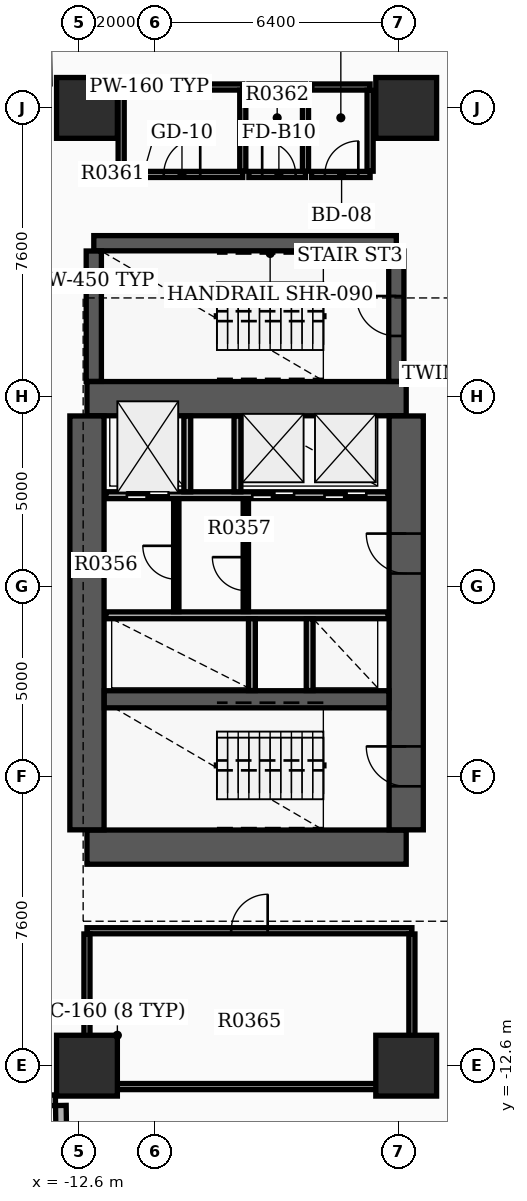
"""IFC4 building model, lengths in metres.
Left out: names, types, materials, properties, quantities, classifications, styles, units other than length and angle.
Written with IfcOpenShell. Run it as: python <this file> out.ifc"""

import sys

from ifc_helpers import new_model, si_unit, direction, frame, frame_2d, origin, origin_2d, place, context, subcontext, project, spatial, rectangle, extrude, element, fill, save


model = new_model("IFC4")
c1 = context("Model", 3, precision=1e-05, world=origin(), true_north=direction((0.0, 1.0)))
c2 = subcontext(c1, "Body", "Model", "MODEL_VIEW")
j1 = project(units=[si_unit("LENGTHUNIT", "METRE"), si_unit("PLANEANGLEUNIT", "RADIAN")], contexts=[c1])
p1 = place(None, origin())
s1 = spatial("IfcSite", under=j1, at=p1, CompositionType="ELEMENT")
p2 = place(p1, origin())
s2 = spatial("IfcBuilding", under=s1, at=p2, CompositionType="ELEMENT")
p3 = place(p2, frame((0.0, 0.0, 27.6)))
s3 = spatial("IfcBuildingStorey", under=s2, at=p3, CompositionType="ELEMENT", Elevation=27.6)
for number, where, z_axis, x_axis in (
    (1, (-12.4, -6.85, 0.0), (0.0, 0.0, 1.0), (1.0, 0.0, 0.0)),
    (2, (-12.4, 4.95, 0.0), (0.0, 0.0, 1.0), (1.0, 0.0, 0.0)),
):
    element("IfcWall", number, at=place(p3, frame(where, z_axis=z_axis, x_axis=x_axis)), inside=s3, PredefinedType="SHEAR", context=c2, shape_type="SweptSolid", body=[
        extrude(rectangle(XDim=8.4, YDim=0.9, at=frame_2d((4.2, 0.0))), origin(), (0.0, 0.0, 1.0), 3.7),
    ])
p4 = place(p3, frame((-12.4, -6.395, 0.0), z_axis=(0.0, 0.0, 1.0), x_axis=(0.0, 1.0, 0.0)))
e3 = element("IfcWall", 3, at=p4, inside=s3, PredefinedType="SHEAR", context=c2, shape_type="SweptSolid", body=[
    extrude(rectangle(XDim=10.89, YDim=0.9, at=frame_2d((5.445, 0.0))), origin(), (0.0, 0.0, 1.0), 3.7),
])
p5 = place(p3, frame((-4.0, -6.395, 0.0), z_axis=(0.0, 0.0, 1.0), x_axis=(0.0, 1.0, 0.0)))
e4 = element("IfcWall", 4, at=p5, inside=s3, PredefinedType="SHEAR", context=c2, shape_type="SweptSolid", body=[
    extrude(rectangle(XDim=10.89, YDim=0.9, at=frame_2d((5.445, 0.0))), origin(), (0.0, 0.0, 1.0), 3.7),
])
p6 = place(p5, frame((1.145, 0.0, 0.0)))
e5 = element("IfcOpeningElement", 5, at=p6, cuts=e4, PredefinedType="OPENING", context=c2, shape_type="SweptSolid", body=[
    extrude(rectangle(XDim=1.05, YDim=2.15, at=frame_2d((0.525, 1.075))), frame((0.0, 0.46, 0.0), z_axis=(0.0, -1.0, 0.0), x_axis=(1.0, 0.0, 0.0)), (0.0, 0.0, 1.0), 0.92),
])
p7 = place(p5, frame((6.745, 0.0, 0.0)))
e6 = element("IfcOpeningElement", 6, at=p7, cuts=e4, PredefinedType="OPENING", context=c2, shape_type="SweptSolid", body=[
    extrude(rectangle(XDim=1.05, YDim=2.15, at=frame_2d((0.525, 1.075))), frame((0.0, 0.46, 0.0), z_axis=(0.0, -1.0, 0.0), x_axis=(1.0, 0.0, 0.0)), (0.0, 0.0, 1.0), 0.92),
])
p8 = place(p3, frame((-11.945, -2.96, 0.0), z_axis=(0.0, 0.0, 1.0), x_axis=(1.0, 0.0, 0.0)))
e7 = element("IfcWall", 7, at=p8, inside=s3, PredefinedType="SHEAR", context=c2, shape_type="SweptSolid", body=[
    extrude(rectangle(XDim=7.49, YDim=0.45, at=frame_2d((3.745, 0.0))), origin(), (0.0, 0.0, 1.0), 3.7),
])
p9 = place(p3, frame((-12.22, 9.04, 0.0), z_axis=(0.0, 0.0, 1.0), x_axis=(1.0, 0.0, 0.0)))
e8 = element("IfcWall", 8, at=p9, inside=s3, PredefinedType="SHEAR", context=c2, shape_type="SweptSolid", body=[
    extrude(rectangle(XDim=7.96, YDim=0.4, at=frame_2d((3.98, 0.0))), origin(), (0.0, 0.0, 1.0), 3.7),
])
p10 = place(p3, frame((-12.22, 5.405, 0.0), z_axis=(0.0, 0.0, 1.0), x_axis=(0.0, 1.0, 0.0)))
e9 = element("IfcWall", 9, at=p10, inside=s3, PredefinedType="SHEAR", context=c2, shape_type="SweptSolid", body=[
    extrude(rectangle(XDim=3.43, YDim=0.4, at=frame_2d((1.715, 0.0))), origin(), (0.0, 0.0, 1.0), 3.7),
])
p11 = place(p3, frame((-4.26, 5.405, 0.0), z_axis=(0.0, 0.0, 1.0), x_axis=(0.0, 1.0, 0.0)))
e10 = element("IfcWall", 10, at=p11, inside=s3, PredefinedType="SHEAR", context=c2, shape_type="SweptSolid", body=[
    extrude(rectangle(XDim=3.43, YDim=0.4, at=frame_2d((1.715, 0.0))), origin(), (0.0, 0.0, 1.0), 3.7),
])
p12 = place(p11, frame((1.195, 0.0, 0.0)))
e11 = element("IfcOpeningElement", 11, at=p12, cuts=e10, PredefinedType="OPENING", context=c2, shape_type="SweptSolid", body=[
    extrude(rectangle(XDim=1.05, YDim=2.15, at=frame_2d((0.525, 1.075))), frame((0.0, 0.21, 0.0), z_axis=(0.0, -1.0, 0.0), x_axis=(1.0, 0.0, 0.0)), (0.0, 0.0, 1.0), 0.42),
])
for number, where, z_axis, x_axis in (
    (12, (-12.4, -12.6, 0.0), (0.0, 0.0, 1.0), (1.0, 0.0, 0.0)),
    (13, (-12.4, 12.6, 0.0), (0.0, 0.0, 1.0), (1.0, 0.0, 0.0)),
    (14, (-4.0, -12.6, 0.0), (0.0, 0.0, 1.0), (1.0, 0.0, 0.0)),
    (15, (-4.0, 12.6, 0.0), (0.0, 0.0, 1.0), (1.0, 0.0, 0.0)),
):
    element("IfcColumn", number, at=place(p3, frame(where, z_axis=z_axis, x_axis=x_axis)), inside=s3, PredefinedType="COLUMN", context=c2, shape_type="SweptSolid", body=[
        extrude(rectangle(XDim=1.6, YDim=1.6, at=origin_2d()), origin(), (0.0, 0.0, 1.0), 3.9),
    ])
p13 = place(p3, frame((-14.449, -13.529, 0.0), z_axis=(0.0, 0.0, 1.0), x_axis=(0.999878147354, 0.015610587569, 0.0)))
e16 = element("IfcWall", 16, at=p13, inside=s3, PredefinedType="STANDARD", context=c2, shape_type="SweptSolid", body=[
    extrude(rectangle(XDim=1.22, YDim=0.28, at=frame_2d((0.61, 0.0))), origin(), (0.0, 0.0, 1.0), 2.91),
])
p14 = place(p3, frame((-13.087, -13.647, 0.0), z_axis=(0.0, 0.0, 1.0), x_axis=(0.015785793208, -0.999875396603, 0.0)))
e17 = element("IfcWall", 17, at=p14, inside=s3, PredefinedType="STANDARD", context=c2, shape_type="SweptSolid", body=[
    extrude(rectangle(XDim=1.5, YDim=0.28, at=frame_2d((0.75, 0.0))), origin(), (0.0, 0.0, 1.0), 2.91),
])
p15 = place(p3, frame((-11.9, 2.41, 0.0), z_axis=(0.0, 0.0, 1.0), x_axis=(1.0, 0.0, 0.0)))
e18 = element("IfcWall", 18, at=p15, inside=s3, PredefinedType="SOLIDWALL", context=c2, shape_type="SweptSolid", body=[
    extrude(rectangle(XDim=7.42, YDim=0.18, at=frame_2d((3.71, 0.0))), origin(), (0.0, 0.0, 1.0), 2.9),
])
p16 = place(p15, frame((0.55, 0.0, 0.0)))
e19 = element("IfcOpeningElement", 19, at=p16, cuts=e18, PredefinedType="OPENING", context=c2, shape_type="SweptSolid", body=[
    extrude(rectangle(XDim=1.1, YDim=2.15, at=frame_2d((0.55, 1.075))), frame((0.0, 0.1, 0.0), z_axis=(0.0, -1.0, 0.0), x_axis=(1.0, 0.0, 0.0)), (0.0, 0.0, 1.0), 0.2),
])
p17 = place(p15, frame((3.85, 0.0, 0.0)))
e20 = element("IfcOpeningElement", 20, at=p17, cuts=e18, PredefinedType="OPENING", context=c2, shape_type="SweptSolid", body=[
    extrude(rectangle(XDim=1.1, YDim=2.15, at=frame_2d((0.55, 1.075))), frame((0.0, 0.1, 0.0), z_axis=(0.0, -1.0, 0.0), x_axis=(1.0, 0.0, 0.0)), (0.0, 0.0, 1.0), 0.2),
])
p18 = place(p15, frame((5.75, 0.0, 0.0)))
e21 = element("IfcOpeningElement", 21, at=p18, cuts=e18, PredefinedType="OPENING", context=c2, shape_type="SweptSolid", body=[
    extrude(rectangle(XDim=1.1, YDim=2.15, at=frame_2d((0.55, 1.075))), frame((0.0, 0.1, 0.0), z_axis=(0.0, -1.0, 0.0), x_axis=(1.0, 0.0, 0.0)), (0.0, 0.0, 1.0), 0.2),
])
p19 = place(p3, frame((-11.9, -0.75, 0.0), z_axis=(0.0, 0.0, 1.0), x_axis=(1.0, 0.0, 0.0)))
e22 = element("IfcWall", 22, at=p19, inside=s3, PredefinedType="SOLIDWALL", context=c2, shape_type="SweptSolid", body=[
    extrude(rectangle(XDim=7.42, YDim=0.18, at=frame_2d((3.71, 0.0))), origin(), (0.0, 0.0, 1.0), 2.9),
])
for number, where, z_axis, x_axis in (
    (23, (-9.76, 2.5, 0.0), (0.0, 0.0, 1.0), (0.0, 1.0, 0.0)),
    (24, (-8.44, 2.5, 0.0), (0.0, 0.0, 1.0), (0.0, 1.0, 0.0)),
):
    element("IfcWall", number, at=place(p3, frame(where, z_axis=z_axis, x_axis=x_axis)), inside=s3, PredefinedType="SOLIDWALL", context=c2, shape_type="SweptSolid", body=[
        extrude(rectangle(XDim=1.99, YDim=0.18, at=frame_2d((0.995, 0.0))), origin(), (0.0, 0.0, 1.0), 2.9),
    ])
for number, where, z_axis, x_axis in (
    (25, (-8.06, -2.73, 0.0), (0.0, 0.0, 1.0), (0.0, 1.0, 0.0)),
    (26, (-6.54, -2.73, 0.0), (0.0, 0.0, 1.0), (0.0, 1.0, 0.0)),
):
    element("IfcWall", number, at=place(p3, frame(where, z_axis=z_axis, x_axis=x_axis)), inside=s3, PredefinedType="SOLIDWALL", context=c2, shape_type="SweptSolid", body=[
        extrude(rectangle(XDim=1.89, YDim=0.18, at=frame_2d((0.945, 0.0))), origin(), (0.0, 0.0, 1.0), 2.9),
    ])
p20 = place(p3, frame((-8.22, -0.65, 0.0), z_axis=(0.0, 0.0, 1.0), x_axis=(0.0, 1.0, 0.0)))
e27 = element("IfcWall", 27, at=p20, inside=s3, PredefinedType="SOLIDWALL", context=c2, shape_type="SweptSolid", body=[
    extrude(rectangle(XDim=2.96, YDim=0.14, at=frame_2d((1.48, 0.0))), origin(), (0.0, 0.0, 1.0), 2.9),
])
p21 = place(p20, frame((0.55, 0.0, 0.0)))
e28 = element("IfcOpeningElement", 28, at=p21, cuts=e27, PredefinedType="OPENING", context=c2, shape_type="SweptSolid", body=[
    extrude(rectangle(XDim=0.88, YDim=2.1, at=frame_2d((0.44, 1.05))), frame((0.0, 0.08, 0.0), z_axis=(0.0, -1.0, 0.0), x_axis=(1.0, 0.0, 0.0)), (0.0, 0.0, 1.0), 0.16),
])
p22 = place(p3, frame((-10.05, -0.652, 0.0), z_axis=(0.0, 0.0, 1.0), x_axis=(0.0, 1.0, 0.0)))
e29 = element("IfcWall", 29, at=p22, inside=s3, PredefinedType="PARTITIONING", context=c2, shape_type="SweptSolid", body=[
    extrude(rectangle(XDim=2.962, YDim=0.14, at=frame_2d((1.481, 0.0))), origin(), (0.0, 0.0, 1.0), 2.9),
])
p23 = place(p22, frame((0.85, 0.0, 0.0)))
e30 = element("IfcOpeningElement", 30, at=p23, cuts=e29, PredefinedType="OPENING", context=c2, shape_type="SweptSolid", body=[
    extrude(rectangle(XDim=0.88, YDim=2.1, at=frame_2d((0.44, 1.05))), frame((0.0, 0.08, 0.0), z_axis=(0.0, -1.0, 0.0), x_axis=(1.0, 0.0, 0.0)), (0.0, 0.0, 1.0), 0.16),
])
p24 = place(p3, frame((-11.5, 10.85, 0.0), z_axis=(0.0, 0.0, 1.0), x_axis=(1.0, 0.0, 0.0)))
e31 = element("IfcWall", 31, at=p24, inside=s3, PredefinedType="PARTITIONING", context=c2, shape_type="SweptSolid", body=[
    extrude(rectangle(XDim=3.2, YDim=0.16, at=frame_2d((1.6, 0.0))), origin(), (0.0, 0.0, 1.0), 2.9),
])
p25 = place(p24, frame((1.12, 0.0, 0.0)))
e32 = element("IfcOpeningElement", 32, at=p25, cuts=e31, PredefinedType="OPENING", context=c2, shape_type="SweptSolid", body=[
    extrude(rectangle(XDim=0.96, YDim=2.15, at=frame_2d((0.48, 1.075))), frame((0.0, 0.09, 0.0), z_axis=(0.0, -1.0, 0.0), x_axis=(1.0, 0.0, 0.0)), (0.0, 0.0, 1.0), 0.18),
])
p26 = place(p3, frame((-11.5, 13.15, 0.0), z_axis=(0.0, 0.0, 1.0), x_axis=(1.0, 0.0, 0.0)))
e33 = element("IfcWall", 33, at=p26, inside=s3, PredefinedType="PARTITIONING", context=c2, shape_type="SweptSolid", body=[
    extrude(rectangle(XDim=3.2, YDim=0.16, at=frame_2d((1.6, 0.0))), origin(), (0.0, 0.0, 1.0), 2.9),
])
for number, where, z_axis, x_axis in (
    (34, (-11.5, 10.935, 0.0), (0.0, 0.0, 1.0), (0.0, 1.0, 0.0)),
    (35, (-8.3, 10.935, 0.0), (0.0, 0.0, 1.0), (0.0, 1.0, 0.0)),
):
    element("IfcWall", number, at=place(p3, frame(where, z_axis=z_axis, x_axis=x_axis)), inside=s3, PredefinedType="PARTITIONING", context=c2, shape_type="SweptSolid", body=[
        extrude(rectangle(XDim=2.13, YDim=0.16, at=frame_2d((1.065, 0.0))), origin(), (0.0, 0.0, 1.0), 2.9),
    ])
p27 = place(p3, frame((-8.14, 10.85, 0.0), z_axis=(0.0, 0.0, 1.0), x_axis=(1.0, 0.0, 0.0)))
e36 = element("IfcWall", 36, at=p27, inside=s3, PredefinedType="PARTITIONING", context=c2, shape_type="SweptSolid", body=[
    extrude(rectangle(XDim=1.49, YDim=0.16, at=frame_2d((0.745, 0.0))), origin(), (0.0, 0.0, 1.0), 2.9),
])
p28 = place(p27, frame((0.35, 0.0, 0.0)))
e37 = element("IfcOpeningElement", 37, at=p28, cuts=e36, PredefinedType="OPENING", context=c2, shape_type="SweptSolid", body=[
    extrude(rectangle(XDim=0.88, YDim=2.1, at=frame_2d((0.44, 1.05))), frame((0.0, 0.09, 0.0), z_axis=(0.0, -1.0, 0.0), x_axis=(1.0, 0.0, 0.0)), (0.0, 0.0, 1.0), 0.18),
])
p29 = place(p3, frame((-8.14, 13.15, 0.0), z_axis=(0.0, 0.0, 1.0), x_axis=(1.0, 0.0, 0.0)))
e38 = element("IfcWall", 38, at=p29, inside=s3, PredefinedType="PARTITIONING", context=c2, shape_type="SweptSolid", body=[
    extrude(rectangle(XDim=1.49, YDim=0.16, at=frame_2d((0.745, 0.0))), origin(), (0.0, 0.0, 1.0), 2.9),
])
p30 = place(p3, frame((-6.65, 10.935, 0.0), z_axis=(0.0, 0.0, 1.0), x_axis=(0.0, 1.0, 0.0)))
e39 = element("IfcWall", 39, at=p30, inside=s3, PredefinedType="PARTITIONING", context=c2, shape_type="SweptSolid", body=[
    extrude(rectangle(XDim=2.13, YDim=0.16, at=frame_2d((1.065, 0.0))), origin(), (0.0, 0.0, 1.0), 2.9),
])
p31 = place(p3, frame((-6.49, 10.85, 0.0), z_axis=(0.0, 0.0, 1.0), x_axis=(1.0, 0.0, 0.0)))
e40 = element("IfcWall", 40, at=p31, inside=s3, PredefinedType="PARTITIONING", context=c2, shape_type="SweptSolid", body=[
    extrude(rectangle(XDim=1.54, YDim=0.16, at=frame_2d((0.77, 0.0))), origin(), (0.0, 0.0, 1.0), 2.9),
])
p32 = place(p31, frame((0.35, 0.0, 0.0)))
e41 = element("IfcOpeningElement", 41, at=p32, cuts=e40, PredefinedType="OPENING", context=c2, shape_type="SweptSolid", body=[
    extrude(rectangle(XDim=0.88, YDim=2.15, at=frame_2d((0.44, 1.075))), frame((0.0, 0.09, 0.0), z_axis=(0.0, -1.0, 0.0), x_axis=(1.0, 0.0, 0.0)), (0.0, 0.0, 1.0), 0.18),
])
p33 = place(p3, frame((-6.49, 13.15, 0.0), z_axis=(0.0, 0.0, 1.0), x_axis=(1.0, 0.0, 0.0)))
e42 = element("IfcWall", 42, at=p33, inside=s3, PredefinedType="PARTITIONING", context=c2, shape_type="SweptSolid", body=[
    extrude(rectangle(XDim=1.54, YDim=0.16, at=frame_2d((0.77, 0.0))), origin(), (0.0, 0.0, 1.0), 2.9),
])
p34 = place(p3, frame((-4.95, 10.935, 0.0), z_axis=(0.0, 0.0, 1.0), x_axis=(0.0, 1.0, 0.0)))
e43 = element("IfcWall", 43, at=p34, inside=s3, PredefinedType="PARTITIONING", context=c2, shape_type="SweptSolid", body=[
    extrude(rectangle(XDim=2.13, YDim=0.16, at=frame_2d((1.065, 0.0))), origin(), (0.0, 0.0, 1.0), 2.9),
])
p35 = place(p3, frame((-12.4, -13.15, 0.0), z_axis=(0.0, 0.0, 1.0), x_axis=(1.0, 0.0, 0.0)))
e44 = element("IfcWall", 44, at=p35, inside=s3, PredefinedType="PARTITIONING", context=c2, shape_type="SweptSolid", body=[
    extrude(rectangle(XDim=8.55, YDim=0.16, at=frame_2d((4.275, 0.0))), origin(), (0.0, 0.0, 1.0), 2.9),
])
p36 = place(p3, frame((-12.4, -9.05, 0.0), z_axis=(0.0, 0.0, 1.0), x_axis=(1.0, 0.0, 0.0)))
e45 = element("IfcWall", 45, at=p36, inside=s3, PredefinedType="PARTITIONING", context=c2, shape_type="SweptSolid", body=[
    extrude(rectangle(XDim=8.55, YDim=0.16, at=frame_2d((4.275, 0.0))), origin(), (0.0, 0.0, 1.0), 2.9),
])
p37 = place(p36, frame((3.795, 0.0, 0.0)))
e46 = element("IfcOpeningElement", 46, at=p37, cuts=e45, PredefinedType="OPENING", context=c2, shape_type="SweptSolid", body=[
    extrude(rectangle(XDim=0.96, YDim=2.15, at=frame_2d((0.48, 1.075))), frame((0.0, 0.09, 0.0), z_axis=(0.0, -1.0, 0.0), x_axis=(1.0, 0.0, 0.0)), (0.0, 0.0, 1.0), 0.18),
])
for number, where, z_axis, x_axis in (
    (47, (-12.4, -13.065, 0.0), (0.0, 0.0, 1.0), (0.0, 1.0, 0.0)),
    (48, (-3.85, -13.065, 0.0), (0.0, 0.0, 1.0), (0.0, 1.0, 0.0)),
):
    element("IfcWall", number, at=place(p3, frame(where, z_axis=z_axis, x_axis=x_axis)), inside=s3, PredefinedType="PARTITIONING", context=c2, shape_type="SweptSolid", body=[
        extrude(rectangle(XDim=3.93, YDim=0.16, at=frame_2d((1.965, 0.0))), origin(), (0.0, 0.0, 1.0), 2.9),
    ])
p38 = place(p6, origin())
e49 = element("IfcDoor", 49, at=p38, inside=s3, OperationType="SINGLE_SWING_RIGHT", PredefinedType="DOOR", context=c2, shape_type="SweptSolid", body=[
    extrude(rectangle(XDim=1.05, YDim=2.15, at=frame_2d((0.525, 1.075))), frame((0.0, 0.025, 0.0), z_axis=(0.0, -1.0, 0.0), x_axis=(1.0, 0.0, 0.0)), (0.0, 0.0, 1.0), 0.05),
])
fill(e5, e49)
p39 = place(p7, origin())
e50 = element("IfcDoor", 50, at=p39, inside=s3, OperationType="SINGLE_SWING_RIGHT", PredefinedType="DOOR", context=c2, shape_type="SweptSolid", body=[
    extrude(rectangle(XDim=1.05, YDim=2.15, at=frame_2d((0.525, 1.075))), frame((0.0, 0.025, 0.0), z_axis=(0.0, -1.0, 0.0), x_axis=(1.0, 0.0, 0.0)), (0.0, 0.0, 1.0), 0.05),
])
fill(e6, e50)
p40 = place(p12, origin())
e51 = element("IfcDoor", 51, at=p40, inside=s3, OperationType="SINGLE_SWING_RIGHT", PredefinedType="DOOR", context=c2, shape_type="SweptSolid", body=[
    extrude(rectangle(XDim=1.05, YDim=2.15, at=frame_2d((0.525, 1.075))), frame((0.0, 0.025, 0.0), z_axis=(0.0, -1.0, 0.0), x_axis=(1.0, 0.0, 0.0)), (0.0, 0.0, 1.0), 0.05),
])
fill(e11, e51)
p41 = place(p16, origin())
e52 = element("IfcDoor", 52, at=p41, inside=s3, OperationType="DOUBLE_DOOR_SLIDING", PredefinedType="DOOR", context=c2, shape_type="SweptSolid", body=[
    extrude(rectangle(XDim=1.1, YDim=2.15, at=frame_2d((0.55, 1.075))), frame((0.0, 0.025, 0.0), z_axis=(0.0, -1.0, 0.0), x_axis=(1.0, 0.0, 0.0)), (0.0, 0.0, 1.0), 0.05),
])
fill(e19, e52)
p42 = place(p17, origin())
e53 = element("IfcDoor", 53, at=p42, inside=s3, OperationType="DOUBLE_DOOR_SLIDING", PredefinedType="DOOR", context=c2, shape_type="SweptSolid", body=[
    extrude(rectangle(XDim=1.1, YDim=2.15, at=frame_2d((0.55, 1.075))), frame((0.0, 0.025, 0.0), z_axis=(0.0, -1.0, 0.0), x_axis=(1.0, 0.0, 0.0)), (0.0, 0.0, 1.0), 0.05),
])
fill(e20, e53)
p43 = place(p18, origin())
e54 = element("IfcDoor", 54, at=p43, inside=s3, OperationType="DOUBLE_DOOR_SLIDING", PredefinedType="DOOR", context=c2, shape_type="SweptSolid", body=[
    extrude(rectangle(XDim=1.1, YDim=2.15, at=frame_2d((0.55, 1.075))), frame((0.0, 0.025, 0.0), z_axis=(0.0, -1.0, 0.0), x_axis=(1.0, 0.0, 0.0)), (0.0, 0.0, 1.0), 0.05),
])
fill(e21, e54)
p44 = place(p21, origin())
e55 = element("IfcDoor", 55, at=p44, inside=s3, OperationType="SINGLE_SWING_RIGHT", PredefinedType="DOOR", context=c2, shape_type="SweptSolid", body=[
    extrude(rectangle(XDim=0.88, YDim=2.1, at=frame_2d((0.44, 1.05))), frame((0.0, 0.025, 0.0), z_axis=(0.0, -1.0, 0.0), x_axis=(1.0, 0.0, 0.0)), (0.0, 0.0, 1.0), 0.05),
])
fill(e28, e55)
p45 = place(p23, origin())
e56 = element("IfcDoor", 56, at=p45, inside=s3, OperationType="SINGLE_SWING_RIGHT", PredefinedType="DOOR", context=c2, shape_type="SweptSolid", body=[
    extrude(rectangle(XDim=0.88, YDim=2.1, at=frame_2d((0.44, 1.05))), frame((0.0, 0.025, 0.0), z_axis=(0.0, -1.0, 0.0), x_axis=(1.0, 0.0, 0.0)), (0.0, 0.0, 1.0), 0.05),
])
fill(e30, e56)
p46 = place(p25, origin())
e57 = element("IfcDoor", 57, at=p46, inside=s3, OperationType="SINGLE_SWING_RIGHT", PredefinedType="DOOR", context=c2, shape_type="SweptSolid", body=[
    extrude(rectangle(XDim=0.96, YDim=2.15, at=frame_2d((0.48, 1.075))), frame((0.0, 0.025, 0.0), z_axis=(0.0, -1.0, 0.0), x_axis=(1.0, 0.0, 0.0)), (0.0, 0.0, 1.0), 0.05),
])
fill(e32, e57)
p47 = place(p28, origin())
e58 = element("IfcDoor", 58, at=p47, inside=s3, OperationType="SINGLE_SWING_LEFT", PredefinedType="DOOR", context=c2, shape_type="SweptSolid", body=[
    extrude(rectangle(XDim=0.88, YDim=2.1, at=frame_2d((0.44, 1.05))), frame((0.0, 0.025, 0.0), z_axis=(0.0, -1.0, 0.0), x_axis=(1.0, 0.0, 0.0)), (0.0, 0.0, 1.0), 0.05),
])
fill(e37, e58)
p48 = place(p32, origin())
e59 = element("IfcDoor", 59, at=p48, inside=s3, OperationType="SINGLE_SWING_RIGHT", PredefinedType="DOOR", context=c2, shape_type="SweptSolid", body=[
    extrude(rectangle(XDim=0.88, YDim=2.15, at=frame_2d((0.44, 1.075))), frame((0.0, 0.025, 0.0), z_axis=(0.0, -1.0, 0.0), x_axis=(1.0, 0.0, 0.0)), (0.0, 0.0, 1.0), 0.05),
])
fill(e41, e59)
p49 = place(p37, origin())
e60 = element("IfcDoor", 60, at=p49, inside=s3, OperationType="SINGLE_SWING_RIGHT", PredefinedType="DOOR", context=c2, shape_type="SweptSolid", body=[
    extrude(rectangle(XDim=0.96, YDim=2.15, at=frame_2d((0.48, 1.075))), frame((0.0, 0.025, 0.0), z_axis=(0.0, -1.0, 0.0), x_axis=(1.0, 0.0, 0.0)), (0.0, 0.0, 1.0), 0.05),
])
fill(e46, e60)
save(model, sys.argv[1])
